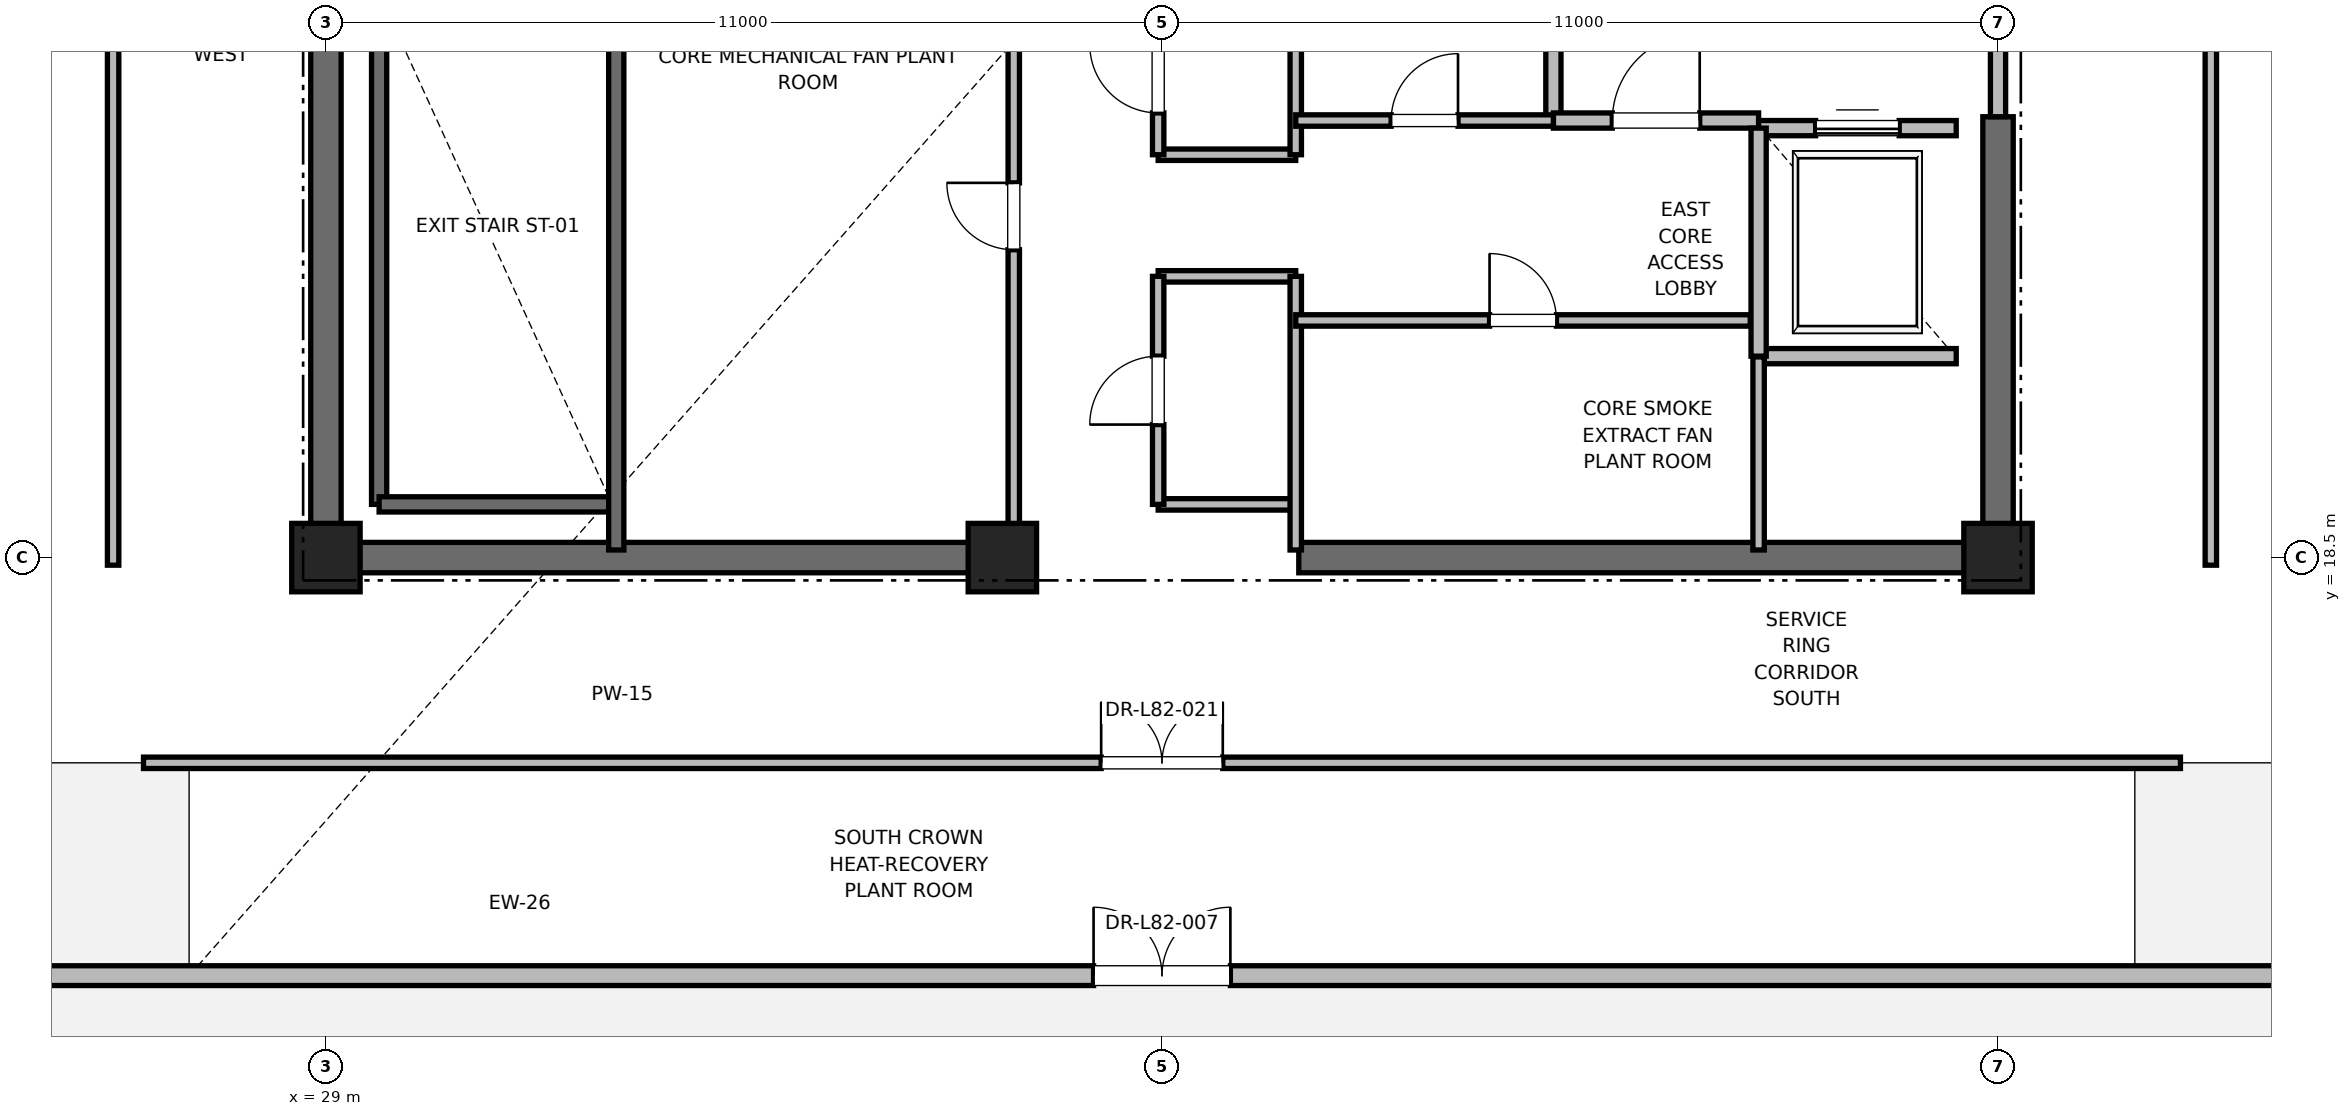
"""IFC4 building model, lengths in metres.
Left out: names, types, materials, properties, quantities, classifications, styles, units other than length and angle.
Written with IfcOpenShell. Run it as: python <this file> out.ifc"""

import sys

from ifc_helpers import new_model, si_unit, direction, frame, frame_2d, origin, origin_2d, place, context, subcontext, project, spatial, rectangle, extrude, element, fill, save


model = new_model("IFC4")
c1 = context("Model", 3, precision=1e-05, world=origin(), true_north=direction((0.0, 1.0)))
c2 = subcontext(c1, "Body", "Model", "MODEL_VIEW")
j1 = project(units=[si_unit("LENGTHUNIT", "METRE"), si_unit("PLANEANGLEUNIT", "RADIAN")], contexts=[c1])
p1 = place(None, origin())
s1 = spatial("IfcSite", under=j1, at=p1, CompositionType="ELEMENT")
p2 = place(p1, origin())
s2 = spatial("IfcBuilding", under=s1, at=p2, CompositionType="ELEMENT")
p3 = place(p2, frame((0.0, 0.0, 354.3)))
s3 = spatial("IfcBuildingStorey", under=s2, at=p3, CompositionType="ELEMENT", Elevation=354.3)
for number, where, z_axis, x_axis in (
    (1, (29.0, 18.5, 0.0), (0.0, 0.0, 1.0), (1.0, 0.0, 0.0)),
    (2, (51.0, 18.5, 0.0), (0.0, 0.0, 1.0), (1.0, 0.0, 0.0)),
    (3, (37.9, 18.5, 0.0), (0.0, 0.0, 1.0), (1.0, 0.0, 0.0)),
):
    element("IfcColumn", number, at=place(p3, frame(where, z_axis=z_axis, x_axis=x_axis)), inside=s3, PredefinedType="PILASTER", context=c2, shape_type="SweptSolid", body=[
        extrude(rectangle(XDim=0.9, YDim=0.9, at=origin_2d()), origin(), (0.0, 0.0, 1.0), 5.5),
    ])
for number, where, z_axis, x_axis in (
    (4, (29.0, 18.5, 0.0), (0.0, 0.0, 1.0), (1.0, 0.0, 0.0)),
    (5, (41.8, 18.5, 0.0), (0.0, 0.0, 1.0), (1.0, 0.0, 0.0)),
):
    element("IfcWall", number, at=place(p3, frame(where, z_axis=z_axis, x_axis=x_axis)), inside=s3, PredefinedType="SHEAR", context=c2, shape_type="SweptSolid", body=[
        extrude(rectangle(XDim=9.2, YDim=0.4, at=frame_2d((4.6, 0.0))), origin(), (0.0, 0.0, 1.0), 5.24),
    ])
p4 = place(p3, frame((29.0, 18.5, 0.0), z_axis=(0.0, 0.0, 1.0), x_axis=(0.0, 1.0, 0.0)))
e6 = element("IfcWall", 6, at=p4, inside=s3, PredefinedType="SHEAR", context=c2, shape_type="SweptSolid", body=[
    extrude(rectangle(XDim=8.8, YDim=0.4, at=frame_2d((4.4, 0.0))), origin(), (0.0, 0.0, 1.0), 5.24),
])
p5 = place(p3, frame((51.0, 18.5, 0.0), z_axis=(0.0, 0.0, 1.0), x_axis=(0.0, 1.0, 0.0)))
e7 = element("IfcWall", 7, at=p5, inside=s3, PredefinedType="SHEAR", context=c2, shape_type="SweptSolid", body=[
    extrude(rectangle(XDim=5.8, YDim=0.4, at=frame_2d((2.9, 0.0))), origin(), (0.0, 0.0, 1.0), 5.24),
])
p6 = place(p3, frame((24.0, 13.0, 0.0), z_axis=(0.0, 0.0, 1.0), x_axis=(1.0, 0.0, 0.0)))
e8 = element("IfcWall", 8, at=p6, inside=s3, PredefinedType="PARAPET", context=c2, shape_type="SweptSolid", body=[
    extrude(rectangle(XDim=32.0, YDim=0.26, at=frame_2d((16.0, 0.0))), origin(), (0.0, 0.0, 1.0), 4.676),
])
p7 = place(p6, frame((15.1, 0.0, 0.0)))
e9 = element("IfcOpeningElement", 9, at=p7, cuts=e8, PredefinedType="OPENING", context=c2, shape_type="SweptSolid", body=[
    extrude(rectangle(XDim=1.8, YDim=2.4, at=frame_2d((0.9, 1.2))), frame((0.0, 0.13, 0.0), z_axis=(0.0, -1.0, 0.0), x_axis=(1.0, 0.0, 0.0)), (0.0, 0.0, 1.0), 0.26),
])
p8 = place(p3, frame((29.7, 19.2, 0.0), z_axis=(0.0, 0.0, 1.0), x_axis=(0.0, 1.0, 0.0)))
e10 = element("IfcWall", 10, at=p8, inside=s3, PredefinedType="SOLIDWALL", context=c2, shape_type="SweptSolid", body=[
    extrude(rectangle(XDim=8.15, YDim=0.2, at=frame_2d((4.075, 0.0))), origin(), (0.0, 0.0, 1.0), 5.24),
])
p9 = place(p3, frame((29.7, 19.2, 0.0), z_axis=(0.0, 0.0, 1.0), x_axis=(1.0, 0.0, 0.0)))
e11 = element("IfcWall", 11, at=p9, inside=s3, PredefinedType="SOLIDWALL", context=c2, shape_type="SweptSolid", body=[
    extrude(rectangle(XDim=3.12, YDim=0.2, at=frame_2d((1.56, 0.0))), origin(), (0.0, 0.0, 1.0), 5.24),
])
p10 = place(p3, frame((32.82, 18.6, 0.0), z_axis=(0.0, 0.0, 1.0), x_axis=(0.0, 1.0, 0.0)))
e12 = element("IfcWall", 12, at=p10, inside=s3, PredefinedType="SOLIDWALL", context=c2, shape_type="SweptSolid", body=[
    extrude(rectangle(XDim=8.78, YDim=0.2, at=frame_2d((4.39, 0.0))), origin(), (0.0, 0.0, 1.0), 5.24),
])
p11 = place(p3, frame((45.15, 24.25, 0.0), z_axis=(0.0, 0.0, 1.0), x_axis=(0.0, 1.0, 0.0)))
e13 = element("IfcWall", 13, at=p11, inside=s3, PredefinedType="PARTITIONING", context=c2, shape_type="SweptSolid", body=[
    extrude(rectangle(XDim=3.37, YDim=0.2, at=frame_2d((1.685, 0.0))), origin(), (0.0, 0.0, 1.0), 5.24),
])
p12 = place(p3, frame((45.15, 24.25, 0.0), z_axis=(0.0, 0.0, 1.0), x_axis=(1.0, 0.0, 0.0)))
e14 = element("IfcWall", 14, at=p12, inside=s3, PredefinedType="PARTITIONING", context=c2, shape_type="SweptSolid", body=[
    extrude(rectangle(XDim=2.7, YDim=0.2, at=frame_2d((1.35, 0.0))), origin(), (0.0, 0.0, 1.0), 5.24),
])
p13 = place(p12, frame((0.775, 0.0, 0.0)))
e15 = element("IfcOpeningElement", 15, at=p13, cuts=e14, PredefinedType="OPENING", context=c2, shape_type="SweptSolid", body=[
    extrude(rectangle(XDim=1.15, YDim=2.2, at=frame_2d((0.575, 1.1))), frame((0.0, 0.1, 0.0), z_axis=(0.0, -1.0, 0.0), x_axis=(1.0, 0.0, 0.0)), (0.0, 0.0, 1.0), 0.2),
])
p14 = place(p3, frame((51.0, 24.3, 0.0), z_axis=(0.0, 0.0, 1.0), x_axis=(0.0, 1.0, 0.0)))
e16 = element("IfcWall", 16, at=p14, inside=s3, PredefinedType="PARTITIONING", context=c2, shape_type="SweptSolid", body=[
    extrude(rectangle(XDim=3.4, YDim=0.2, at=frame_2d((1.7, 0.0))), origin(), (0.0, 0.0, 1.0), 4.32),
])
p15 = place(p14, frame((1.125, 0.0, 0.0)))
e17 = element("IfcOpeningElement", 17, at=p15, cuts=e16, PredefinedType="OPENING", context=c2, shape_type="SweptSolid", body=[
    extrude(rectangle(XDim=1.15, YDim=2.2, at=frame_2d((0.575, 1.1))), frame((0.0, 0.1, 0.0), z_axis=(0.0, -1.0, 0.0), x_axis=(1.0, 0.0, 0.0)), (0.0, 0.0, 1.0), 0.2),
])
p16 = place(p3, frame((47.85, 21.15, 0.0), z_axis=(0.0, 0.0, 1.0), x_axis=(1.0, 0.0, 0.0)))
e18 = element("IfcWall", 18, at=p16, inside=s3, PredefinedType="SOLIDWALL", context=c2, shape_type="SweptSolid", body=[
    extrude(rectangle(XDim=2.6, YDim=0.2, at=frame_2d((1.3, 0.0))), origin(), (0.0, 0.0, 1.0), 5.24),
])
p17 = place(p3, frame((50.45, 24.15, 0.0), z_axis=(0.0, 0.0, 1.0), x_axis=(-1.0, 0.0, 0.0)))
e19 = element("IfcWall", 19, at=p17, inside=s3, PredefinedType="SOLIDWALL", context=c2, shape_type="SweptSolid", body=[
    extrude(rectangle(XDim=2.6, YDim=0.2, at=frame_2d((1.3, 0.0))), origin(), (0.0, 0.0, 1.0), 4.32),
])
p18 = place(p17, frame((0.75, 0.0, 0.0)))
e20 = element("IfcOpeningElement", 20, at=p18, cuts=e19, PredefinedType="OPENING", context=c2, shape_type="SweptSolid", body=[
    extrude(rectangle(XDim=1.1, YDim=2.2, at=frame_2d((0.55, 1.1))), frame((0.0, 0.1, 0.0), z_axis=(0.0, -1.0, 0.0), x_axis=(1.0, 0.0, 0.0)), (0.0, 0.0, 1.0), 0.2),
])
p19 = place(p3, frame((47.85, 24.15, 0.0), z_axis=(0.0, 0.0, 1.0), x_axis=(0.0, -1.0, 0.0)))
e21 = element("IfcWall", 21, at=p19, inside=s3, PredefinedType="SOLIDWALL", context=c2, shape_type="SweptSolid", body=[
    extrude(rectangle(XDim=3.0, YDim=0.2, at=frame_2d((1.5, 0.0))), origin(), (0.0, 0.0, 1.0), 5.24),
])
for number, where, z_axis, x_axis in (
    (22, (39.95, 19.2, 0.0), (0.0, 0.0, 1.0), (1.0, 0.0, 0.0)),
    (23, (39.95, 22.2, 0.0), (0.0, 0.0, 1.0), (1.0, 0.0, 0.0)),
    (24, (39.95, 23.8, 0.0), (0.0, 0.0, 1.0), (1.0, 0.0, 0.0)),
):
    element("IfcWall", number, at=place(p3, frame(where, z_axis=z_axis, x_axis=x_axis)), inside=s3, PredefinedType="PARTITIONING", context=c2, shape_type="SweptSolid", body=[
        extrude(rectangle(XDim=1.81, YDim=0.15, at=frame_2d((0.905, 0.0))), origin(), (0.0, 0.0, 1.0), 2.85),
    ])
p20 = place(p3, frame((41.76, 18.6, 0.0), z_axis=(0.0, 0.0, 1.0), x_axis=(0.0, 1.0, 0.0)))
e25 = element("IfcWall", 25, at=p20, inside=s3, PredefinedType="PARTITIONING", context=c2, shape_type="SweptSolid", body=[
    extrude(rectangle(XDim=3.6, YDim=0.15, at=frame_2d((1.8, 0.0))), origin(), (0.0, 0.0, 1.0), 2.85),
])
p21 = place(p3, frame((41.76, 23.8, 0.0), z_axis=(0.0, 0.0, 1.0), x_axis=(0.0, 1.0, 0.0)))
e26 = element("IfcWall", 26, at=p21, inside=s3, PredefinedType="PARTITIONING", context=c2, shape_type="SweptSolid", body=[
    extrude(rectangle(XDim=4.0, YDim=0.15, at=frame_2d((2.0, 0.0))), origin(), (0.0, 0.0, 1.0), 2.85),
])
p22 = place(p3, frame((39.95, 19.2, 0.0), z_axis=(0.0, 0.0, 1.0), x_axis=(0.0, 1.0, 0.0)))
e27 = element("IfcWall", 27, at=p22, inside=s3, PredefinedType="PARTITIONING", context=c2, shape_type="SweptSolid", body=[
    extrude(rectangle(XDim=3.0, YDim=0.15, at=frame_2d((1.5, 0.0))), origin(), (0.0, 0.0, 1.0), 2.85),
])
p23 = place(p22, frame((1.05, 0.0, 0.0)))
e28 = element("IfcOpeningElement", 28, at=p23, cuts=e27, PredefinedType="OPENING", context=c2, shape_type="SweptSolid", body=[
    extrude(rectangle(XDim=0.9, YDim=2.1, at=frame_2d((0.45, 1.05))), frame((0.0, 0.075, 0.0), z_axis=(0.0, -1.0, 0.0), x_axis=(1.0, 0.0, 0.0)), (0.0, 0.0, 1.0), 0.15),
])
p24 = place(p3, frame((39.95, 23.8, 0.0), z_axis=(0.0, 0.0, 1.0), x_axis=(0.0, 1.0, 0.0)))
e29 = element("IfcWall", 29, at=p24, inside=s3, PredefinedType="PARTITIONING", context=c2, shape_type="SweptSolid", body=[
    extrude(rectangle(XDim=2.0, YDim=0.15, at=frame_2d((1.0, 0.0))), origin(), (0.0, 0.0, 1.0), 2.85),
])
p25 = place(p24, frame((0.55, 0.0, 0.0)))
e30 = element("IfcOpeningElement", 30, at=p25, cuts=e29, PredefinedType="OPENING", context=c2, shape_type="SweptSolid", body=[
    extrude(rectangle(XDim=0.9, YDim=2.1, at=frame_2d((0.45, 1.05))), frame((0.0, 0.075, 0.0), z_axis=(0.0, -1.0, 0.0), x_axis=(1.0, 0.0, 0.0)), (0.0, 0.0, 1.0), 0.15),
])
p26 = place(p3, frame((38.05, 18.6, 0.0), z_axis=(0.0, 0.0, 1.0), x_axis=(0.0, 1.0, 0.0)))
e31 = element("IfcWall", 31, at=p26, inside=s3, PredefinedType="PARTITIONING", context=c2, shape_type="SweptSolid", body=[
    extrude(rectangle(XDim=8.78, YDim=0.15, at=frame_2d((4.39, 0.0))), origin(), (0.0, 0.0, 1.0), 2.85),
])
p27 = place(p26, frame((3.95, 0.0, 0.0)))
e32 = element("IfcOpeningElement", 32, at=p27, cuts=e31, PredefinedType="OPENING", context=c2, shape_type="SweptSolid", body=[
    extrude(rectangle(XDim=0.88, YDim=2.1, at=frame_2d((0.44, 1.05))), frame((0.0, 0.075, 0.0), z_axis=(0.0, -1.0, 0.0), x_axis=(1.0, 0.0, 0.0)), (0.0, 0.0, 1.0), 0.15),
])
p28 = place(p3, frame((47.85, 18.6, 0.0), z_axis=(0.0, 0.0, 1.0), x_axis=(0.0, 1.0, 0.0)))
e33 = element("IfcWall", 33, at=p28, inside=s3, PredefinedType="PARTITIONING", context=c2, shape_type="SweptSolid", body=[
    extrude(rectangle(XDim=2.54, YDim=0.15, at=frame_2d((1.27, 0.0))), origin(), (0.0, 0.0, 1.0), 2.85),
])
p29 = place(p3, frame((41.76, 21.62, 0.0), z_axis=(0.0, 0.0, 1.0), x_axis=(1.0, 0.0, 0.0)))
e34 = element("IfcWall", 34, at=p29, inside=s3, PredefinedType="PARTITIONING", context=c2, shape_type="SweptSolid", body=[
    extrude(rectangle(XDim=5.98, YDim=0.15, at=frame_2d((2.99, 0.0))), origin(), (0.0, 0.0, 1.0), 2.85),
])
p30 = place(p29, frame((2.55, 0.0, 0.0)))
e35 = element("IfcOpeningElement", 35, at=p30, cuts=e34, PredefinedType="OPENING", context=c2, shape_type="SweptSolid", body=[
    extrude(rectangle(XDim=0.88, YDim=2.1, at=frame_2d((0.44, 1.05))), frame((0.0, 0.075, 0.0), z_axis=(0.0, -1.0, 0.0), x_axis=(1.0, 0.0, 0.0)), (0.0, 0.0, 1.0), 0.15),
])
p31 = place(p3, frame((41.76, 24.25, 0.0), z_axis=(0.0, 0.0, 1.0), x_axis=(1.0, 0.0, 0.0)))
e36 = element("IfcWall", 36, at=p31, inside=s3, PredefinedType="PARTITIONING", context=c2, shape_type="SweptSolid", body=[
    extrude(rectangle(XDim=3.39, YDim=0.15, at=frame_2d((1.695, 0.0))), origin(), (0.0, 0.0, 1.0), 2.85),
])
p32 = place(p31, frame((1.255, 0.0, 0.0)))
e37 = element("IfcOpeningElement", 37, at=p32, cuts=e36, PredefinedType="OPENING", context=c2, shape_type="SweptSolid", body=[
    extrude(rectangle(XDim=0.88, YDim=2.1, at=frame_2d((0.44, 1.05))), frame((0.0, 0.075, 0.0), z_axis=(0.0, -1.0, 0.0), x_axis=(1.0, 0.0, 0.0)), (0.0, 0.0, 1.0), 0.15),
])
p33 = place(p3, frame((26.2, 18.4, 0.0), z_axis=(0.0, 0.0, 1.0), x_axis=(0.0, 1.0, 0.0)))
e38 = element("IfcWall", 38, at=p33, inside=s3, PredefinedType="PARTITIONING", context=c2, shape_type="SweptSolid", body=[
    extrude(rectangle(XDim=18.2, YDim=0.15, at=frame_2d((9.1, 0.0))), origin(), (0.0, 0.0, 1.0), 2.85),
])
p34 = place(p33, frame((8.3, 0.0, 0.0)))
e39 = element("IfcOpeningElement", 39, at=p34, cuts=e38, PredefinedType="OPENING", context=c2, shape_type="SweptSolid", body=[
    extrude(rectangle(XDim=1.6, YDim=2.25, at=frame_2d((0.8, 1.125))), frame((0.0, 0.075, 0.0), z_axis=(0.0, -1.0, 0.0), x_axis=(1.0, 0.0, 0.0)), (0.0, 0.0, 1.0), 0.15),
])
p35 = place(p3, frame((53.8, 18.4, 0.0), z_axis=(0.0, 0.0, 1.0), x_axis=(0.0, 1.0, 0.0)))
e40 = element("IfcWall", 40, at=p35, inside=s3, PredefinedType="PARTITIONING", context=c2, shape_type="SweptSolid", body=[
    extrude(rectangle(XDim=18.2, YDim=0.15, at=frame_2d((9.1, 0.0))), origin(), (0.0, 0.0, 1.0), 2.85),
])
p36 = place(p35, frame((8.3, 0.0, 0.0)))
e41 = element("IfcOpeningElement", 41, at=p36, cuts=e40, PredefinedType="OPENING", context=c2, shape_type="SweptSolid", body=[
    extrude(rectangle(XDim=1.6, YDim=2.25, at=frame_2d((0.8, 1.125))), frame((0.0, 0.075, 0.0), z_axis=(0.0, -1.0, 0.0), x_axis=(1.0, 0.0, 0.0)), (0.0, 0.0, 1.0), 0.15),
])
p37 = place(p3, frame((26.6, 15.8, 0.0), z_axis=(0.0, 0.0, 1.0), x_axis=(1.0, 0.0, 0.0)))
e42 = element("IfcWall", 42, at=p37, inside=s3, PredefinedType="PARTITIONING", context=c2, shape_type="SweptSolid", body=[
    extrude(rectangle(XDim=26.8, YDim=0.15, at=frame_2d((13.4, 0.0))), origin(), (0.0, 0.0, 1.0), 2.85),
])
p38 = place(p37, frame((12.6, 0.0, 0.0)))
e43 = element("IfcOpeningElement", 43, at=p38, cuts=e42, PredefinedType="OPENING", context=c2, shape_type="SweptSolid", body=[
    extrude(rectangle(XDim=1.6, YDim=2.25, at=frame_2d((0.8, 1.125))), frame((0.0, 0.075, 0.0), z_axis=(0.0, -1.0, 0.0), x_axis=(1.0, 0.0, 0.0)), (0.0, 0.0, 1.0), 0.15),
])
p39 = place(p7, origin())
e44 = element("IfcDoor", 44, at=p39, inside=s3, OperationType="DOUBLE_DOOR_SINGLE_SWING", PredefinedType="DOOR", context=c2, shape_type="SweptSolid", body=[
    extrude(rectangle(XDim=1.8, YDim=2.4, at=frame_2d((0.9, 1.2))), frame((0.0, 0.025, 0.0), z_axis=(0.0, -1.0, 0.0), x_axis=(1.0, 0.0, 0.0)), (0.0, 0.0, 1.0), 0.05),
])
fill(e9, e44)
p40 = place(p13, origin())
e45 = element("IfcDoor", 45, at=p40, inside=s3, OperationType="SINGLE_SWING_RIGHT", PredefinedType="DOOR", context=c2, shape_type="SweptSolid", body=[
    extrude(rectangle(XDim=1.15, YDim=2.2, at=frame_2d((0.575, 1.1))), frame((0.0, 0.025, 0.0), z_axis=(0.0, -1.0, 0.0), x_axis=(1.0, 0.0, 0.0)), (0.0, 0.0, 1.0), 0.05),
])
fill(e15, e45)
p41 = place(p18, origin())
e46 = element("IfcDoor", 46, at=p41, inside=s3, OperationType="SLIDING_TO_RIGHT", PredefinedType="DOOR", context=c2, shape_type="SweptSolid", body=[
    extrude(rectangle(XDim=1.1, YDim=2.2, at=frame_2d((0.55, 1.1))), frame((0.0, 0.025, 0.0), z_axis=(0.0, -1.0, 0.0), x_axis=(1.0, 0.0, 0.0)), (0.0, 0.0, 1.0), 0.05),
])
fill(e20, e46)
p42 = place(p23, origin())
e47 = element("IfcDoor", 47, at=p42, inside=s3, OperationType="SINGLE_SWING_LEFT", PredefinedType="DOOR", context=c2, shape_type="SweptSolid", body=[
    extrude(rectangle(XDim=0.9, YDim=2.1, at=frame_2d((0.45, 1.05))), frame((0.0, 0.025, 0.0), z_axis=(0.0, -1.0, 0.0), x_axis=(1.0, 0.0, 0.0)), (0.0, 0.0, 1.0), 0.05),
])
fill(e28, e47)
p43 = place(p25, origin())
e48 = element("IfcDoor", 48, at=p43, inside=s3, OperationType="SINGLE_SWING_RIGHT", PredefinedType="DOOR", context=c2, shape_type="SweptSolid", body=[
    extrude(rectangle(XDim=0.9, YDim=2.1, at=frame_2d((0.45, 1.05))), frame((0.0, 0.025, 0.0), z_axis=(0.0, -1.0, 0.0), x_axis=(1.0, 0.0, 0.0)), (0.0, 0.0, 1.0), 0.05),
])
fill(e30, e48)
p44 = place(p27, origin())
e49 = element("IfcDoor", 49, at=p44, inside=s3, OperationType="SINGLE_SWING_RIGHT", PredefinedType="DOOR", context=c2, shape_type="SweptSolid", body=[
    extrude(rectangle(XDim=0.88, YDim=2.1, at=frame_2d((0.44, 1.05))), frame((0.0, 0.025, 0.0), z_axis=(0.0, -1.0, 0.0), x_axis=(1.0, 0.0, 0.0)), (0.0, 0.0, 1.0), 0.05),
])
fill(e32, e49)
p45 = place(p30, origin())
e50 = element("IfcDoor", 50, at=p45, inside=s3, OperationType="SINGLE_SWING_LEFT", PredefinedType="DOOR", context=c2, shape_type="SweptSolid", body=[
    extrude(rectangle(XDim=0.88, YDim=2.1, at=frame_2d((0.44, 1.05))), frame((0.0, 0.025, 0.0), z_axis=(0.0, -1.0, 0.0), x_axis=(1.0, 0.0, 0.0)), (0.0, 0.0, 1.0), 0.05),
])
fill(e35, e50)
p46 = place(p32, origin())
e51 = element("IfcDoor", 51, at=p46, inside=s3, OperationType="SINGLE_SWING_RIGHT", PredefinedType="DOOR", context=c2, shape_type="SweptSolid", body=[
    extrude(rectangle(XDim=0.88, YDim=2.1, at=frame_2d((0.44, 1.05))), frame((0.0, 0.025, 0.0), z_axis=(0.0, -1.0, 0.0), x_axis=(1.0, 0.0, 0.0)), (0.0, 0.0, 1.0), 0.05),
])
fill(e37, e51)
p47 = place(p38, origin())
e52 = element("IfcDoor", 52, at=p47, inside=s3, OperationType="DOUBLE_DOOR_SINGLE_SWING", PredefinedType="DOOR", context=c2, shape_type="SweptSolid", body=[
    extrude(rectangle(XDim=1.6, YDim=2.25, at=frame_2d((0.8, 1.125))), frame((0.0, 0.025, 0.0), z_axis=(0.0, -1.0, 0.0), x_axis=(1.0, 0.0, 0.0)), (0.0, 0.0, 1.0), 0.05),
])
fill(e43, e52)
save(model, sys.argv[1])
